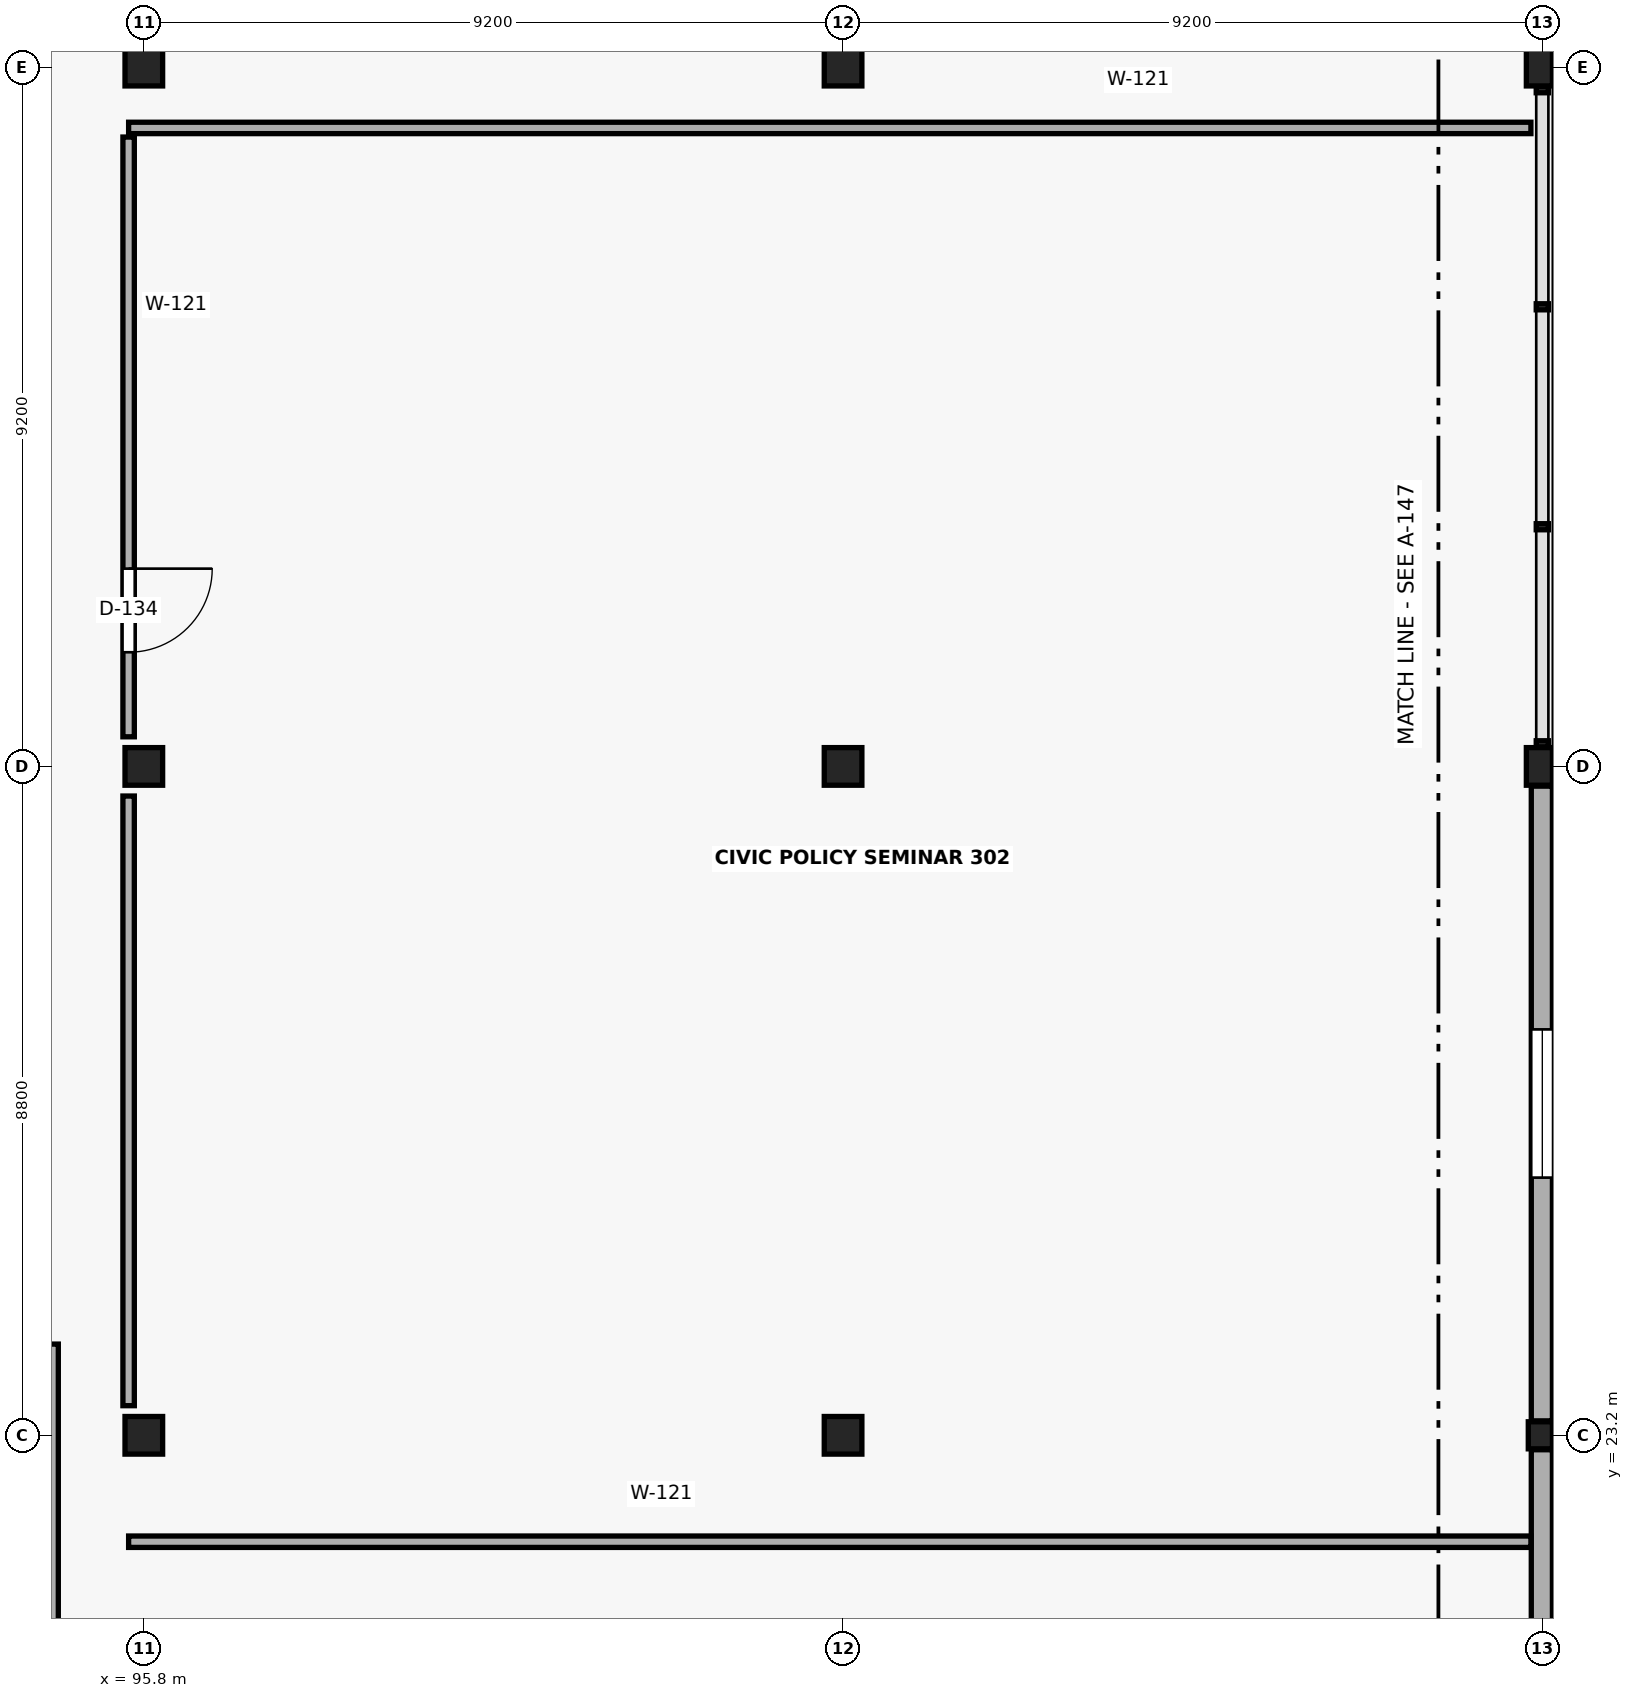
"""IFC4 building model, lengths in metres.
Left out: names, types, materials, properties, quantities, classifications, styles, units other than length and angle.
Written with IfcOpenShell. Run it as: python <this file> out.ifc"""

import sys

from ifc_helpers import new_model, si_unit, direction, frame, frame_2d, origin, origin_2d, place, context, subcontext, project, spatial, rectangle, i_section, extrude, element, fill, save


model = new_model("IFC4")
c1 = context("Model", 3, precision=1e-05, world=origin(), true_north=direction((0.0, 1.0)))
c2 = subcontext(c1, "Body", "Model", "MODEL_VIEW")
j1 = project(units=[si_unit("LENGTHUNIT", "METRE"), si_unit("PLANEANGLEUNIT", "RADIAN")], contexts=[c1])
p1 = place(None, origin())
s1 = spatial("IfcSite", under=j1, at=p1, CompositionType="ELEMENT")
p2 = place(p1, origin())
s2 = spatial("IfcBuilding", under=s1, at=p2, CompositionType="ELEMENT")
p3 = place(p2, frame((0.0, 0.0, 14.4)))
s3 = spatial("IfcBuildingStorey", under=s2, at=p3, CompositionType="ELEMENT", Elevation=14.4)
for number, where, z_axis, x_axis in (
    (1, (95.8, 23.2, 0.0), (0.0, 0.0, 1.0), (1.0, 0.0, 0.0)),
    (2, (95.8, 32.0, 0.0), (0.0, 0.0, 1.0), (1.0, 0.0, 0.0)),
    (3, (95.8, 41.2, 0.0), (0.0, 0.0, 1.0), (1.0, 0.0, 0.0)),
    (4, (105.0, 23.2, 0.0), (0.0, 0.0, 1.0), (1.0, 0.0, 0.0)),
    (5, (105.0, 32.0, 0.0), (0.0, 0.0, 1.0), (1.0, 0.0, 0.0)),
    (6, (105.0, 41.2, 0.0), (0.0, 0.0, 1.0), (1.0, 0.0, 0.0)),
):
    element("IfcColumn", number, at=place(p3, frame(where, z_axis=z_axis, x_axis=x_axis)), inside=s3, PredefinedType="COLUMN", context=c2, shape_type="SweptSolid", body=[
        extrude(rectangle(XDim=0.495, YDim=0.495, at=origin_2d()), origin(), (0.0, 0.0, 1.0), 3.9),
    ])
p4 = place(p3, frame((114.2, 23.2, 0.0), z_axis=(0.0, 0.0, 1.0), x_axis=(1.0, 0.0, 0.0)))
e7 = element("IfcColumn", 7, at=p4, inside=s3, PredefinedType="COLUMN", context=c2, shape_type="SweptSolid", body=[
    extrude(i_section(OverallWidth=0.369, OverallDepth=0.356, WebThickness=0.011, FlangeThickness=0.018, at=origin_2d()), origin(), (0.0, 0.0, 1.0), 3.9),
])
for number, where, z_axis, x_axis in (
    (8, (114.2, 32.0, 0.0), (0.0, 0.0, 1.0), (1.0, 0.0, 0.0)),
    (9, (114.2, 41.2, 0.0), (0.0, 0.0, 1.0), (1.0, 0.0, 0.0)),
):
    element("IfcColumn", number, at=place(p3, frame(where, z_axis=z_axis, x_axis=x_axis)), inside=s3, PredefinedType="COLUMN", context=c2, shape_type="SweptSolid", body=[
        extrude(rectangle(XDim=0.42, YDim=0.495, at=origin_2d()), origin(), (0.0, 0.0, 1.0), 3.9),
    ])
p5 = place(p3, frame((114.2, 23.01, 0.0), z_axis=(0.0, 0.0, 1.0), x_axis=(0.0, -1.0, 0.0)))
e10 = element("IfcWall", 10, at=p5, inside=s3, PredefinedType="SOLIDWALL", context=c2, shape_type="SweptSolid", body=[
    extrude(rectangle(XDim=8.82, YDim=0.29, at=frame_2d((4.41, 0.0))), origin(), (0.0, 0.0, 1.0), 2.855),
])
p6 = place(p5, frame((3.435, 0.0, 0.85)))
e11 = element("IfcOpeningElement", 11, at=p6, cuts=e10, PredefinedType="OPENING", context=c2, shape_type="SweptSolid", body=[
    extrude(rectangle(XDim=1.95, YDim=1.9, at=frame_2d((0.975, 0.95))), frame((0.0, 0.157, 0.0), z_axis=(0.0, -1.0, 0.0), x_axis=(1.0, 0.0, 0.0)), (0.0, 0.0, 1.0), 0.314),
])
p7 = place(p3, frame((114.2, 31.74, 0.0), z_axis=(0.0, 0.0, 1.0), x_axis=(0.0, -1.0, 0.0)))
e12 = element("IfcWall", 12, at=p7, inside=s3, PredefinedType="SOLIDWALL", context=c2, shape_type="SweptSolid", body=[
    extrude(rectangle(XDim=8.351, YDim=0.29, at=frame_2d((4.175, 0.0))), origin(), (0.0, 0.0, 1.0), 2.855),
])
p8 = place(p7, frame((3.2, 0.0, 0.85)))
e13 = element("IfcOpeningElement", 13, at=p8, cuts=e12, PredefinedType="OPENING", context=c2, shape_type="SweptSolid", body=[
    extrude(rectangle(XDim=1.95, YDim=1.9, at=frame_2d((0.975, 0.95))), frame((0.0, 0.157, 0.0), z_axis=(0.0, -1.0, 0.0), x_axis=(1.0, 0.0, 0.0)), (0.0, 0.0, 1.0), 0.314),
])
p9 = place(p3, frame((94.6, 5.3, 0.0), z_axis=(0.0, 0.0, 1.0), x_axis=(0.0, 1.0, 0.0)))
e14 = element("IfcWall", 14, at=p9, inside=s3, PredefinedType="PARTITIONING", context=c2, shape_type="SweptSolid", body=[
    extrude(rectangle(XDim=19.1, YDim=0.15, at=frame_2d((9.55, 0.0))), origin(), (0.0, 0.0, 1.0), 3.655),
])
for number, where, z_axis, x_axis in (
    (15, (95.6, 21.8, 0.0), (0.0, 0.0, 1.0), (1.0, 0.0, 0.0)),
    (16, (114.05, 40.4, 0.0), (0.0, 0.0, 1.0), (-1.0, 0.0, 0.0)),
):
    element("IfcWall", number, at=place(p3, frame(where, z_axis=z_axis, x_axis=x_axis)), inside=s3, PredefinedType="PARTITIONING", context=c2, shape_type="SweptSolid", body=[
        extrude(rectangle(XDim=18.45, YDim=0.15, at=frame_2d((9.225, 0.0))), origin(), (0.0, 0.0, 1.0), 3.655),
    ])
p10 = place(p3, frame((95.6, 40.28, 0.0), z_axis=(0.0, 0.0, 1.0), x_axis=(0.0, -1.0, 0.0)))
e17 = element("IfcWall", 17, at=p10, inside=s3, PredefinedType="PARTITIONING", context=c2, shape_type="SweptSolid", body=[
    extrude(rectangle(XDim=7.89, YDim=0.15, at=frame_2d((3.945, 0.0))), origin(), (0.0, 0.0, 1.0), 3.655),
])
p11 = place(p10, frame((5.678, 0.0, 0.0)))
e18 = element("IfcOpeningElement", 18, at=p11, cuts=e17, PredefinedType="OPENING", context=c2, shape_type="SweptSolid", body=[
    extrude(rectangle(XDim=1.1, YDim=2.25, at=frame_2d((0.55, 1.125))), frame((0.0, 0.087, 0.0), z_axis=(0.0, -1.0, 0.0), x_axis=(1.0, 0.0, 0.0)), (0.0, 0.0, 1.0), 0.174),
])
p12 = place(p3, frame((95.6, 31.61, 0.0), z_axis=(0.0, 0.0, 1.0), x_axis=(0.0, -1.0, 0.0)))
e19 = element("IfcWall", 19, at=p12, inside=s3, PredefinedType="PARTITIONING", context=c2, shape_type="SweptSolid", body=[
    extrude(rectangle(XDim=8.021, YDim=0.15, at=frame_2d((4.01, 0.0))), origin(), (0.0, 0.0, 1.0), 3.655),
])
p13 = place(p8, origin())
e20 = element("IfcWindow", 20, at=p13, inside=s3, PartitioningType="SINGLE_PANEL", PredefinedType="WINDOW", context=c2, shape_type="SweptSolid", body=[
    extrude(rectangle(XDim=1.95, YDim=1.9, at=frame_2d((0.975, 0.95))), frame((0.0, 0.03, 0.0), z_axis=(0.0, -1.0, 0.0), x_axis=(1.0, 0.0, 0.0)), (0.0, 0.0, 1.0), 0.06),
])
fill(e13, e20)
p14 = place(p11, origin())
e21 = element("IfcDoor", 21, at=p14, inside=s3, OperationType="SINGLE_SWING_LEFT", PredefinedType="DOOR", context=c2, shape_type="SweptSolid", body=[
    extrude(rectangle(XDim=1.1, YDim=2.25, at=frame_2d((0.55, 1.125))), frame((0.0, 0.025, 0.0), z_axis=(0.0, -1.0, 0.0), x_axis=(1.0, 0.0, 0.0)), (0.0, 0.0, 1.0), 0.05),
])
fill(e18, e21)
save(model, sys.argv[1])
